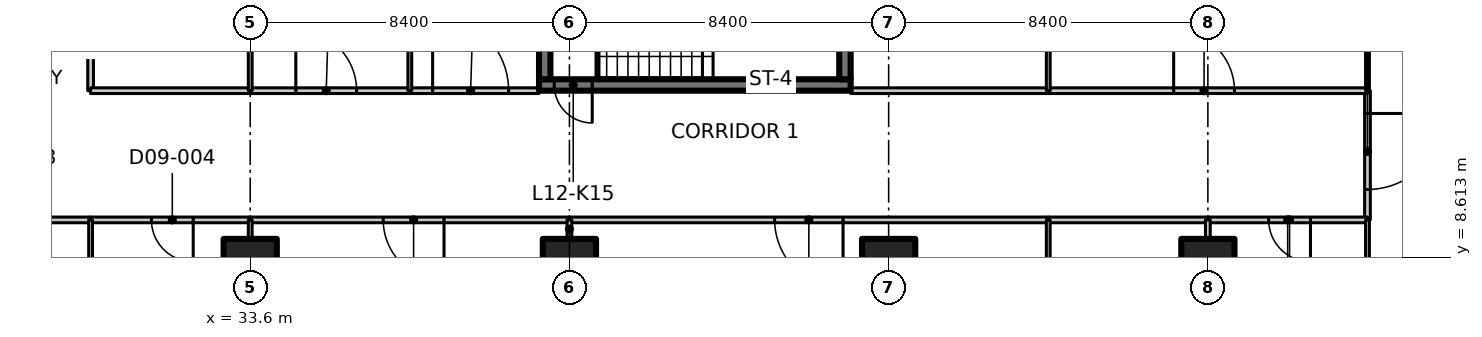
"""IFC4 building model, lengths in metres.
Left out: names, types, materials, properties, quantities, classifications, styles, units other than length and angle.
Written with IfcOpenShell. Run it as: python <this file> out.ifc"""

import sys

from ifc_helpers import new_model, si_unit, direction, frame, frame_2d, origin, origin_2d, place, context, subcontext, project, spatial, polyline, rectangle, outline, extrude, element, fill, save


model = new_model("IFC4")
c1 = context("Model", 3, precision=1e-05, world=origin(), true_north=direction((0.0, 1.0)))
c2 = subcontext(c1, "Body", "Model", "MODEL_VIEW")
j1 = project(units=[si_unit("LENGTHUNIT", "METRE"), si_unit("PLANEANGLEUNIT", "RADIAN")], contexts=[c1])
p1 = place(None, origin())
s1 = spatial("IfcSite", under=j1, at=p1, CompositionType="ELEMENT")
p2 = place(p1, origin())
s2 = spatial("IfcBuilding", under=s1, at=p2, CompositionType="ELEMENT")
p3 = place(p2, frame((0.0, 0.0, 58.1)))
s3 = spatial("IfcBuildingStorey", under=s2, at=p3, CompositionType="ELEMENT", Elevation=58.1)
for number, where, z_axis, x_axis in (
    (1, (33.6, 8.4, 0.0), (0.0, 0.0, 1.0), (1.0, 0.0, 0.0)),
    (2, (42.0, 8.4, 0.0), (0.0, 0.0, 1.0), (1.0, 0.0, 0.0)),
    (3, (50.4, 8.4, 0.0), (0.0, 0.0, 1.0), (1.0, 0.0, 0.0)),
    (4, (58.8, 8.4, 0.0), (0.0, 0.0, 1.0), (1.0, 0.0, 0.0)),
):
    element("IfcColumn", number, at=place(p3, frame(where, z_axis=z_axis, x_axis=x_axis)), inside=s3, PredefinedType="COLUMN", context=c2, shape_type="SweptSolid", body=[
        extrude(rectangle(XDim=1.4, YDim=1.4, at=origin_2d()), origin(), (0.0, 0.0, 1.0), 3.35),
    ])
p4 = place(p3, frame((49.4, 13.15, 0.0), z_axis=(0.0, 0.0, 1.0), x_axis=(-1.0, 0.0, 0.0)))
e5 = element("IfcWall", 5, at=p4, inside=s3, PredefinedType="SHEAR", context=c2, shape_type="SweptSolid", body=[
    extrude(rectangle(XDim=8.2, YDim=0.3, at=frame_2d((4.1, 0.0))), origin(), (0.0, 0.0, 1.0), 3.35),
])
p5 = place(p4, frame((6.8, 0.0, 0.0)))
e6 = element("IfcOpeningElement", 6, at=p5, cuts=e5, PredefinedType="OPENING", context=c2, shape_type="SweptSolid", body=[
    extrude(rectangle(XDim=1.0, YDim=2.1, at=frame_2d((0.5, 1.05))), frame((0.0, 0.16, 0.0), z_axis=(0.0, -1.0, 0.0), x_axis=(1.0, 0.0, 0.0)), (0.0, 0.0, 1.0), 0.32),
])
for number, where, z_axis, x_axis in (
    (7, (41.35, 13.3, 0.0), (0.0, 0.0, 1.0), (0.0, 1.0, 0.0)),
    (8, (49.25, 13.3, 0.0), (0.0, 0.0, 1.0), (0.0, 1.0, 0.0)),
):
    element("IfcWall", number, at=place(p3, frame(where, z_axis=z_axis, x_axis=x_axis)), inside=s3, PredefinedType="SHEAR", context=c2, shape_type="SweptSolid", body=[
        extrude(rectangle(XDim=2.55, YDim=0.3, at=frame_2d((1.275, 0.0))), origin(), (0.0, 0.0, 1.0), 3.35),
    ])
p6 = place(p3, frame((29.4, 9.6, 0.0), z_axis=(0.0, 0.0, 1.0), x_axis=(-1.0, 0.0, 0.0)))
e9 = element("IfcWall", 9, at=p6, inside=s3, PredefinedType="PARTITIONING", context=c2, shape_type="SweptSolid", body=[
    extrude(rectangle(XDim=4.2, YDim=0.15, at=frame_2d((2.1, 0.0))), origin(), (0.0, 0.0, 1.0), 3.33),
])
p7 = place(p6, frame((1.5, 0.0, 0.0)))
e10 = element("IfcOpeningElement", 10, at=p7, cuts=e9, PredefinedType="OPENING", context=c2, shape_type="SweptSolid", body=[
    extrude(rectangle(XDim=1.1, YDim=2.1, at=frame_2d((0.55, 1.05))), frame((0.0, 0.085, 0.0), z_axis=(0.0, -1.0, 0.0), x_axis=(1.0, 0.0, 0.0)), (0.0, 0.0, 1.0), 0.17),
])
p8 = place(p3, frame((29.4, 21.2, 0.0), z_axis=(0.0, 0.0, 1.0), x_axis=(0.0, -1.0, 0.0)))
e11 = element("IfcWall", 11, at=p8, inside=s3, PredefinedType="PARTITIONING", context=c2, shape_type="SweptSolid", body=[
    extrude(rectangle(XDim=8.2, YDim=0.15, at=frame_2d((4.1, 0.0))), origin(), (0.0, 0.0, 1.0), 3.33),
])
p9 = place(p8, frame((3.3, 0.0, 0.0)))
e12 = element("IfcOpeningElement", 12, at=p9, cuts=e11, PredefinedType="OPENING", context=c2, shape_type="SweptSolid", body=[
    extrude(rectangle(XDim=1.6, YDim=2.1, at=frame_2d((0.8, 1.05))), frame((0.0, 0.085, 0.0), z_axis=(0.0, -1.0, 0.0), x_axis=(1.0, 0.0, 0.0)), (0.0, 0.0, 1.0), 0.17),
])
p10 = place(p3, frame((63.0, 13.0, 0.0), z_axis=(0.0, 0.0, 1.0), x_axis=(0.0, -1.0, 0.0)))
e13 = element("IfcWall", 13, at=p10, inside=s3, PredefinedType="PARTITIONING", context=c2, shape_type="SweptSolid", body=[
    extrude(rectangle(XDim=3.4, YDim=0.15, at=frame_2d((1.7, 0.0))), origin(), (0.0, 0.0, 1.0), 3.33),
])
p11 = place(p10, frame((0.6, 0.0, 0.0)))
e14 = element("IfcOpeningElement", 14, at=p11, cuts=e13, PredefinedType="OPENING", context=c2, shape_type="SweptSolid", body=[
    extrude(rectangle(XDim=2.0, YDim=2.4, at=frame_2d((1.0, 1.2))), frame((0.0, 0.085, 0.0), z_axis=(0.0, -1.0, 0.0), x_axis=(1.0, 0.0, 0.0)), (0.0, 0.0, 1.0), 0.17),
])
p12 = place(p3, frame((33.6, 9.6, 0.0), z_axis=(0.0, 0.0, 1.0), x_axis=(-1.0, 0.0, 0.0)))
e15 = element("IfcWall", 15, at=p12, inside=s3, PredefinedType="PARTITIONING", context=c2, shape_type="SweptSolid", body=[
    extrude(rectangle(XDim=4.2, YDim=0.15, at=frame_2d((2.1, 0.0))), origin(), (0.0, 0.0, 1.0), 3.33),
])
p13 = place(p12, frame((1.5, 0.0, 0.0)))
e16 = element("IfcOpeningElement", 16, at=p13, cuts=e15, PredefinedType="OPENING", context=c2, shape_type="SweptSolid", body=[
    extrude(rectangle(XDim=1.1, YDim=2.1, at=frame_2d((0.55, 1.05))), frame((0.0, 0.085, 0.0), z_axis=(0.0, -1.0, 0.0), x_axis=(1.0, 0.0, 0.0)), (0.0, 0.0, 1.0), 0.17),
])
p14 = place(p3, frame((42.0, 9.6, 0.0), z_axis=(0.0, 0.0, 1.0), x_axis=(-1.0, 0.0, 0.0)))
e17 = element("IfcWall", 17, at=p14, inside=s3, PredefinedType="PARTITIONING", context=c2, shape_type="SweptSolid", body=[
    extrude(rectangle(XDim=8.4, YDim=0.15, at=frame_2d((4.2, 0.0))), origin(), (0.0, 0.0, 1.0), 3.33),
])
p15 = place(p14, frame((3.3, 0.0, 0.0)))
e18 = element("IfcOpeningElement", 18, at=p15, cuts=e17, PredefinedType="OPENING", context=c2, shape_type="SweptSolid", body=[
    extrude(rectangle(XDim=1.6, YDim=2.1, at=frame_2d((0.8, 1.05))), frame((0.0, 0.085, 0.0), z_axis=(0.0, -1.0, 0.0), x_axis=(1.0, 0.0, 0.0)), (0.0, 0.0, 1.0), 0.17),
])
p16 = place(p3, frame((54.6, 9.6, 0.0), z_axis=(0.0, 0.0, 1.0), x_axis=(-1.0, 0.0, 0.0)))
e19 = element("IfcWall", 19, at=p16, inside=s3, PredefinedType="PARTITIONING", context=c2, shape_type="SweptSolid", body=[
    extrude(rectangle(XDim=12.6, YDim=0.15, at=frame_2d((6.3, 0.0))), origin(), (0.0, 0.0, 1.0), 3.33),
])
p17 = place(p16, frame((5.4, 0.0, 0.0)))
e20 = element("IfcOpeningElement", 20, at=p17, cuts=e19, PredefinedType="OPENING", context=c2, shape_type="SweptSolid", body=[
    extrude(rectangle(XDim=1.8, YDim=2.1, at=frame_2d((0.9, 1.05))), frame((0.0, 0.085, 0.0), z_axis=(0.0, -1.0, 0.0), x_axis=(1.0, 0.0, 0.0)), (0.0, 0.0, 1.0), 0.17),
])
p18 = place(p3, frame((58.8, 9.6, 0.0), z_axis=(0.0, 0.0, 1.0), x_axis=(-1.0, 0.0, 0.0)))
e21 = element("IfcWall", 21, at=p18, inside=s3, PredefinedType="PARTITIONING", context=c2, shape_type="SweptSolid", body=[
    extrude(rectangle(XDim=4.2, YDim=0.15, at=frame_2d((2.1, 0.0))), origin(), (0.0, 0.0, 1.0), 3.33),
])
p19 = place(p3, frame((63.0, 9.6, 0.0), z_axis=(0.0, 0.0, 1.0), x_axis=(-1.0, 0.0, 0.0)))
e22 = element("IfcWall", 22, at=p19, inside=s3, PredefinedType="PARTITIONING", context=c2, shape_type="SweptSolid", body=[
    extrude(rectangle(XDim=4.2, YDim=0.15, at=frame_2d((2.1, 0.0))), origin(), (0.0, 0.0, 1.0), 3.33),
])
p20 = place(p19, frame((1.5, 0.0, 0.0)))
e23 = element("IfcOpeningElement", 23, at=p20, cuts=e22, PredefinedType="OPENING", context=c2, shape_type="SweptSolid", body=[
    extrude(rectangle(XDim=1.1, YDim=2.1, at=frame_2d((0.55, 1.05))), frame((0.0, 0.085, 0.0), z_axis=(0.0, -1.0, 0.0), x_axis=(1.0, 0.0, 0.0)), (0.0, 0.0, 1.0), 0.17),
])
p21 = place(p3, frame((29.4, 13.0, 0.0), z_axis=(0.0, 0.0, 1.0), x_axis=(1.0, 0.0, 0.0)))
e24 = element("IfcWall", 24, at=p21, inside=s3, PredefinedType="PARTITIONING", context=c2, shape_type="SweptSolid", body=[
    extrude(rectangle(XDim=4.2, YDim=0.15, at=frame_2d((2.1, 0.0))), origin(), (0.0, 0.0, 1.0), 3.33),
])
p22 = place(p3, frame((33.6, 13.0, 0.0), z_axis=(0.0, 0.0, 1.0), x_axis=(1.0, 0.0, 0.0)))
e25 = element("IfcWall", 25, at=p22, inside=s3, PredefinedType="PARTITIONING", context=c2, shape_type="SweptSolid", body=[
    extrude(rectangle(XDim=4.2, YDim=0.15, at=frame_2d((2.1, 0.0))), origin(), (0.0, 0.0, 1.0), 3.33),
])
p23 = place(p22, frame((1.2, 0.0, 0.0)))
e26 = element("IfcOpeningElement", 26, at=p23, cuts=e25, PredefinedType="OPENING", context=c2, shape_type="SweptSolid", body=[
    extrude(rectangle(XDim=1.6, YDim=2.1, at=frame_2d((0.8, 1.05))), frame((0.0, 0.085, 0.0), z_axis=(0.0, -1.0, 0.0), x_axis=(1.0, 0.0, 0.0)), (0.0, 0.0, 1.0), 0.17),
])
p24 = place(p3, frame((37.8, 13.0, 0.0), z_axis=(0.0, 0.0, 1.0), x_axis=(1.0, 0.0, 0.0)))
e27 = element("IfcWall", 27, at=p24, inside=s3, PredefinedType="PARTITIONING", context=c2, shape_type="SweptSolid", body=[
    extrude(rectangle(XDim=3.4, YDim=0.15, at=frame_2d((1.7, 0.0))), origin(), (0.0, 0.0, 1.0), 3.33),
])
p25 = place(p24, frame((0.6, 0.0, 0.0)))
e28 = element("IfcOpeningElement", 28, at=p25, cuts=e27, PredefinedType="OPENING", context=c2, shape_type="SweptSolid", body=[
    extrude(rectangle(XDim=2.0, YDim=2.4, at=frame_2d((1.0, 1.2))), frame((0.0, 0.085, 0.0), z_axis=(0.0, -1.0, 0.0), x_axis=(1.0, 0.0, 0.0)), (0.0, 0.0, 1.0), 0.17),
])
p26 = place(p3, frame((49.4, 13.0, 0.0), z_axis=(0.0, 0.0, 1.0), x_axis=(1.0, 0.0, 0.0)))
e29 = element("IfcWall", 29, at=p26, inside=s3, PredefinedType="PARTITIONING", context=c2, shape_type="SweptSolid", body=[
    extrude(rectangle(XDim=5.2, YDim=0.15, at=frame_2d((2.6, 0.0))), origin(), (0.0, 0.0, 1.0), 3.33),
])
p27 = place(p3, frame((54.6, 13.0, 0.0), z_axis=(0.0, 0.0, 1.0), x_axis=(1.0, 0.0, 0.0)))
e30 = element("IfcWall", 30, at=p27, inside=s3, PredefinedType="PARTITIONING", context=c2, shape_type="SweptSolid", body=[
    extrude(rectangle(XDim=8.4, YDim=0.15, at=frame_2d((4.2, 0.0))), origin(), (0.0, 0.0, 1.0), 3.33),
])
p28 = place(p27, frame((3.3, 0.0, 0.0)))
e31 = element("IfcOpeningElement", 31, at=p28, cuts=e30, PredefinedType="OPENING", context=c2, shape_type="SweptSolid", body=[
    extrude(rectangle(XDim=1.6, YDim=2.1, at=frame_2d((0.8, 1.05))), frame((0.0, 0.085, 0.0), z_axis=(0.0, -1.0, 0.0), x_axis=(1.0, 0.0, 0.0)), (0.0, 0.0, 1.0), 0.17),
])
p29 = place(p3, frame((63.0, -0.2, 0.0), z_axis=(0.0, 0.0, 1.0), x_axis=(0.0, 1.0, 0.0)))
e32 = element("IfcWall", 32, at=p29, inside=s3, PredefinedType="PARTITIONING", context=c2, shape_type="SweptSolid", body=[
    extrude(outline(polyline([(0.0, 0.0), (9.8, 0.0), (9.8, 3.33), (5.066, 3.33), (5.064, 2.98), (3.736, 2.98), (3.734, 3.33), (0.0, 3.33), (0.0, 0.0)])), frame((0.0, 0.05, 0.0), z_axis=(0.0, -1.0, 0.0), x_axis=(1.0, 0.0, 0.0)), (0.0, 0.0, 1.0), 0.1),
])
p30 = place(p3, frame((63.0, 13.0, 0.0), z_axis=(0.0, 0.0, 1.0), x_axis=(0.0, 1.0, 0.0)))
e33 = element("IfcWall", 33, at=p30, inside=s3, PredefinedType="PARTITIONING", context=c2, shape_type="SweptSolid", body=[
    extrude(outline(polyline([(0.0, 0.0), (12.4, 0.0), (12.4, 3.33), (8.666, 3.33), (8.664, 2.98), (7.336, 2.98), (7.334, 3.33), (0.0, 3.33), (0.0, 0.0)])), frame((0.0, 0.05, 0.0), z_axis=(0.0, -1.0, 0.0), x_axis=(1.0, 0.0, 0.0)), (0.0, 0.0, 1.0), 0.1),
])
p31 = place(p3, frame((29.4, 9.6, 0.0), z_axis=(0.0, 0.0, 1.0), x_axis=(0.0, -1.0, 0.0)))
e34 = element("IfcWall", 34, at=p31, inside=s3, PredefinedType="PARTITIONING", context=c2, shape_type="SweptSolid", body=[
    extrude(outline(polyline([(0.0, 0.0), (10.965, 0.0), (10.965, 3.33), (10.7, 3.33), (10.05, 3.33), (10.048, 2.98), (9.152, 2.98), (9.15, 3.33), (0.0, 3.33), (0.0, 0.0)])), frame((0.0, 0.05, 0.0), z_axis=(0.0, -1.0, 0.0), x_axis=(1.0, 0.0, 0.0)), (0.0, 0.0, 1.0), 0.1),
])
p32 = place(p3, frame((33.6, 9.6, 0.0), z_axis=(0.0, 0.0, 1.0), x_axis=(0.0, -1.0, 0.0)))
e35 = element("IfcWall", 35, at=p32, inside=s3, PredefinedType="PARTITIONING", context=c2, shape_type="SweptSolid", body=[
    extrude(rectangle(XDim=0.48, YDim=0.1, at=frame_2d((0.24, 0.0))), origin(), (0.0, 0.0, 1.0), 3.33),
])
p33 = place(p3, frame((42.0, 9.6, 0.0), z_axis=(0.0, 0.0, 1.0), x_axis=(0.0, -1.0, 0.0)))
e36 = element("IfcWall", 36, at=p33, inside=s3, PredefinedType="PARTITIONING", context=c2, shape_type="SweptSolid", body=[
    extrude(rectangle(XDim=0.48, YDim=0.125, at=frame_2d((0.24, 0.0))), origin(), (0.0, 0.0, 1.0), 3.33),
])
p34 = place(p3, frame((54.6, 9.6, 0.0), z_axis=(0.0, 0.0, 1.0), x_axis=(0.0, -1.0, 0.0)))
e37 = element("IfcWall", 37, at=p34, inside=s3, PredefinedType="PARTITIONING", context=c2, shape_type="SweptSolid", body=[
    extrude(rectangle(XDim=4.2, YDim=0.1, at=frame_2d((2.1, 0.0))), origin(), (0.0, 0.0, 1.0), 3.33),
])
p35 = place(p3, frame((58.8, 9.6, 0.0), z_axis=(0.0, 0.0, 1.0), x_axis=(0.0, -1.0, 0.0)))
e38 = element("IfcWall", 38, at=p35, inside=s3, PredefinedType="PARTITIONING", context=c2, shape_type="SweptSolid", body=[
    extrude(rectangle(XDim=0.48, YDim=0.125, at=frame_2d((0.24, 0.0))), origin(), (0.0, 0.0, 1.0), 3.33),
])
p36 = place(p3, frame((33.6, 16.08, 0.0), z_axis=(0.0, 0.0, 1.0), x_axis=(0.0, -1.0, 0.0)))
e39 = element("IfcWall", 39, at=p36, inside=s3, PredefinedType="PARTITIONING", context=c2, shape_type="SweptSolid", body=[
    extrude(rectangle(XDim=3.08, YDim=0.1, at=frame_2d((1.54, 0.0))), origin(), (0.0, 0.0, 1.0), 3.33),
])
p37 = place(p3, frame((37.8, 30.243, 0.0), z_axis=(0.0, 0.0, 1.0), x_axis=(0.0, -1.0, 0.0)))
e40 = element("IfcWall", 40, at=p37, inside=s3, PredefinedType="PARTITIONING", context=c2, shape_type="SweptSolid", body=[
    extrude(outline(polyline([(0.0, 0.0), (17.243, 0.0), (17.243, 3.33), (5.493, 3.33), (5.491, 2.98), (4.595, 2.98), (4.593, 3.33), (0.0, 3.33), (0.0, 0.0)])), frame((0.0, 0.05, 0.0), z_axis=(0.0, -1.0, 0.0), x_axis=(1.0, 0.0, 0.0)), (0.0, 0.0, 1.0), 0.1),
])
p38 = place(p3, frame((54.6, 26.374, 0.0), z_axis=(0.0, 0.0, 1.0), x_axis=(0.0, -1.0, 0.0)))
e41 = element("IfcWall", 41, at=p38, inside=s3, PredefinedType="PARTITIONING", context=c2, shape_type="SweptSolid", body=[
    extrude(outline(polyline([(0.0, 0.0), (13.374, 0.0), (13.374, 3.33), (1.624, 3.33), (1.622, 2.98), (0.726, 2.98), (0.724, 3.33), (0.074, 3.33), (0.0, 3.33), (0.0, 0.0)])), frame((0.0, 0.05, 0.0), z_axis=(0.0, -1.0, 0.0), x_axis=(1.0, 0.0, 0.0)), (0.0, 0.0, 1.0), 0.1),
])
p39 = place(p5, origin())
e42 = element("IfcDoor", 42, at=p39, inside=s3, OperationType="SINGLE_SWING_RIGHT", PredefinedType="DOOR", context=c2, shape_type="SweptSolid", body=[
    extrude(rectangle(XDim=1.0, YDim=2.1, at=frame_2d((0.5, 1.05))), frame((0.0, 0.025, 0.0), z_axis=(0.0, -1.0, 0.0), x_axis=(1.0, 0.0, 0.0)), (0.0, 0.0, 1.0), 0.05),
])
fill(e6, e42)
p40 = place(p11, origin())
e43 = element("IfcDoor", 43, at=p40, inside=s3, OperationType="DOUBLE_DOOR_SINGLE_SWING", PredefinedType="DOOR", context=c2, shape_type="SweptSolid", body=[
    extrude(rectangle(XDim=2.0, YDim=2.4, at=frame_2d((1.0, 1.2))), frame((0.0, 0.025, 0.0), z_axis=(0.0, -1.0, 0.0), x_axis=(1.0, 0.0, 0.0)), (0.0, 0.0, 1.0), 0.05),
])
fill(e14, e43)
p41 = place(p13, origin())
e44 = element("IfcDoor", 44, at=p41, inside=s3, OperationType="SINGLE_SWING_LEFT", PredefinedType="DOOR", context=c2, shape_type="SweptSolid", body=[
    extrude(rectangle(XDim=1.1, YDim=2.1, at=frame_2d((0.55, 1.05))), frame((0.0, 0.025, 0.0), z_axis=(0.0, -1.0, 0.0), x_axis=(1.0, 0.0, 0.0)), (0.0, 0.0, 1.0), 0.05),
])
fill(e16, e44)
p42 = place(p15, origin())
e45 = element("IfcDoor", 45, at=p42, inside=s3, OperationType="DOUBLE_DOOR_SINGLE_SWING", PredefinedType="DOOR", context=c2, shape_type="SweptSolid", body=[
    extrude(rectangle(XDim=1.6, YDim=2.1, at=frame_2d((0.8, 1.05))), frame((0.0, 0.025, 0.0), z_axis=(0.0, -1.0, 0.0), x_axis=(1.0, 0.0, 0.0)), (0.0, 0.0, 1.0), 0.05),
])
fill(e18, e45)
p43 = place(p17, origin())
e46 = element("IfcDoor", 46, at=p43, inside=s3, OperationType="DOUBLE_DOOR_SINGLE_SWING", PredefinedType="DOOR", context=c2, shape_type="SweptSolid", body=[
    extrude(rectangle(XDim=1.8, YDim=2.1, at=frame_2d((0.9, 1.05))), frame((0.0, 0.025, 0.0), z_axis=(0.0, -1.0, 0.0), x_axis=(1.0, 0.0, 0.0)), (0.0, 0.0, 1.0), 0.05),
])
fill(e20, e46)
p44 = place(p20, origin())
e47 = element("IfcDoor", 47, at=p44, inside=s3, OperationType="SINGLE_SWING_LEFT", PredefinedType="DOOR", context=c2, shape_type="SweptSolid", body=[
    extrude(rectangle(XDim=1.1, YDim=2.1, at=frame_2d((0.55, 1.05))), frame((0.0, 0.025, 0.0), z_axis=(0.0, -1.0, 0.0), x_axis=(1.0, 0.0, 0.0)), (0.0, 0.0, 1.0), 0.05),
])
fill(e23, e47)
p45 = place(p23, origin())
e48 = element("IfcDoor", 48, at=p45, inside=s3, OperationType="DOUBLE_DOOR_SINGLE_SWING", PredefinedType="DOOR", context=c2, shape_type="SweptSolid", body=[
    extrude(rectangle(XDim=1.6, YDim=2.1, at=frame_2d((0.8, 1.05))), frame((0.0, 0.025, 0.0), z_axis=(0.0, -1.0, 0.0), x_axis=(1.0, 0.0, 0.0)), (0.0, 0.0, 1.0), 0.05),
])
fill(e26, e48)
p46 = place(p25, origin())
e49 = element("IfcDoor", 49, at=p46, inside=s3, OperationType="DOUBLE_DOOR_SINGLE_SWING", PredefinedType="DOOR", context=c2, shape_type="SweptSolid", body=[
    extrude(rectangle(XDim=2.0, YDim=2.4, at=frame_2d((1.0, 1.2))), frame((0.0, 0.025, 0.0), z_axis=(0.0, -1.0, 0.0), x_axis=(1.0, 0.0, 0.0)), (0.0, 0.0, 1.0), 0.05),
])
fill(e28, e49)
p47 = place(p28, origin())
e50 = element("IfcDoor", 50, at=p47, inside=s3, OperationType="DOUBLE_DOOR_SINGLE_SWING", PredefinedType="DOOR", context=c2, shape_type="SweptSolid", body=[
    extrude(rectangle(XDim=1.6, YDim=2.1, at=frame_2d((0.8, 1.05))), frame((0.0, 0.025, 0.0), z_axis=(0.0, -1.0, 0.0), x_axis=(1.0, 0.0, 0.0)), (0.0, 0.0, 1.0), 0.05),
])
fill(e31, e50)
save(model, sys.argv[1])
